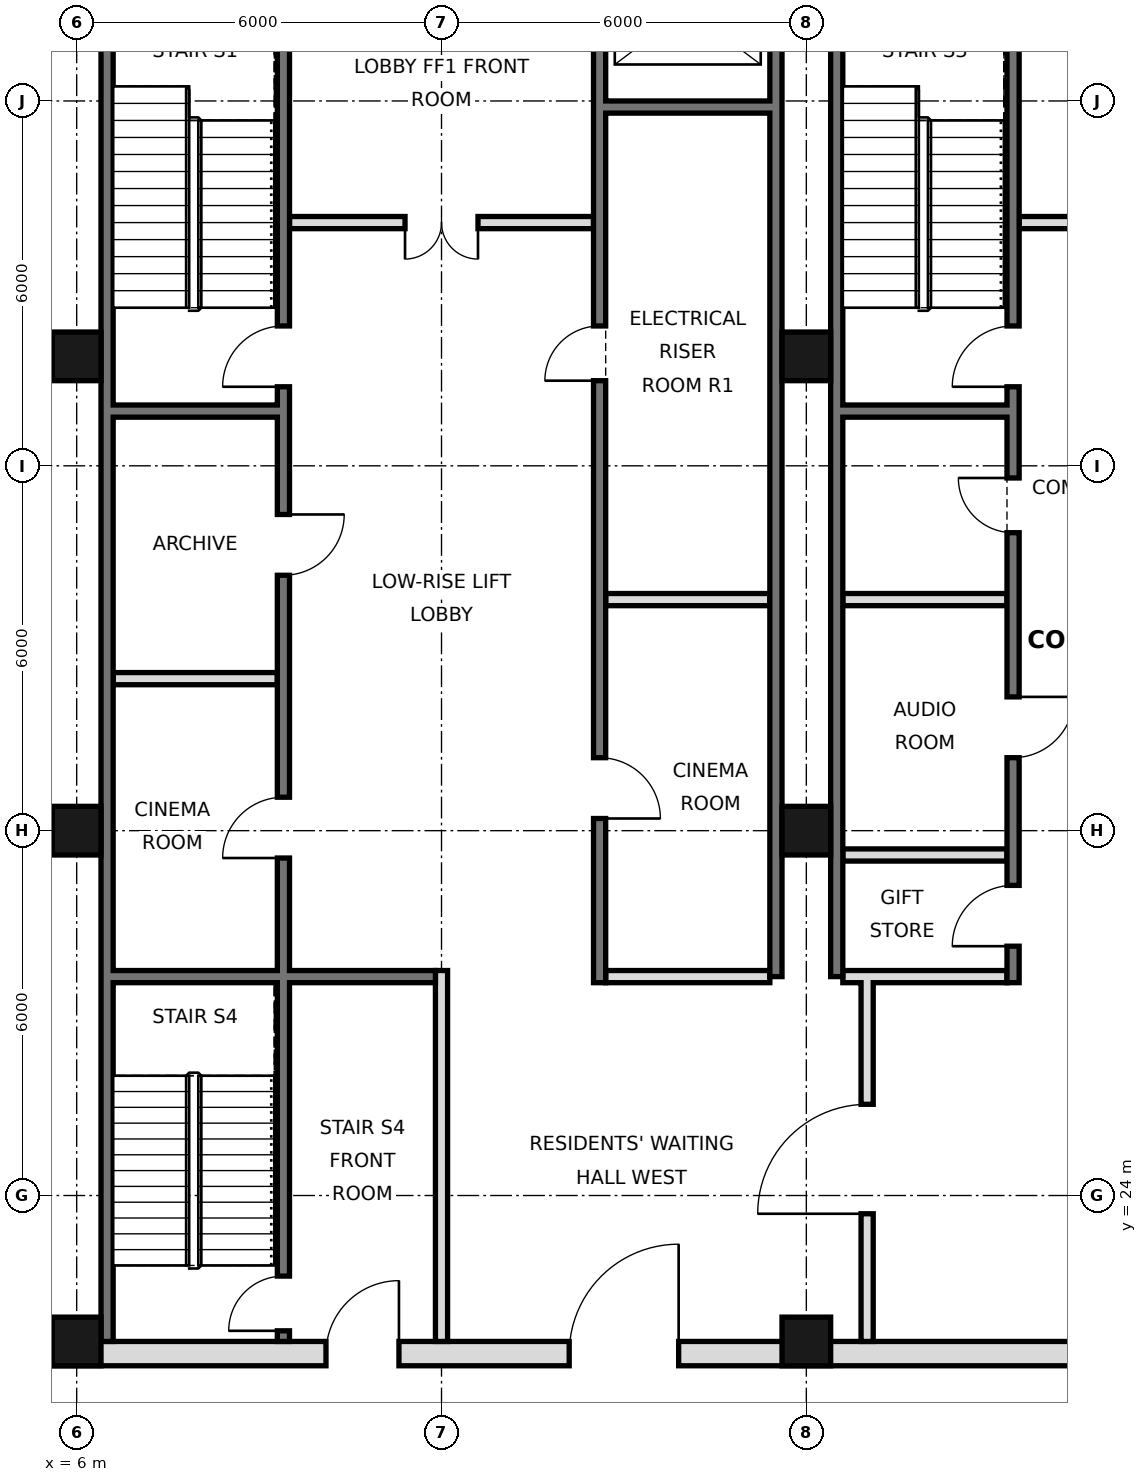
"""IFC4 building model, lengths in metres.
Left out: names, types, materials, properties, quantities, classifications, styles, units other than length and angle.
Written with IfcOpenShell. Run it as: python <this file> out.ifc"""

import sys

from ifc_helpers import new_model, si_unit, direction, frame, frame_2d, origin, origin_2d, place, context, subcontext, project, spatial, rectangle, hollow_rectangle, extrude, element, fill, save


model = new_model("IFC4")
c1 = context("Model", 3, precision=1e-05, world=origin(), true_north=direction((0.0, 1.0)))
c2 = subcontext(c1, "Body", "Model", "MODEL_VIEW")
j1 = project(units=[si_unit("LENGTHUNIT", "METRE"), si_unit("PLANEANGLEUNIT", "RADIAN")], contexts=[c1])
p1 = place(None, origin())
s1 = spatial("IfcSite", under=j1, at=p1, CompositionType="ELEMENT")
p2 = place(p1, origin())
s2 = spatial("IfcBuilding", under=s1, at=p2, CompositionType="ELEMENT")
p3 = place(p2, frame((0.0, 0.0, 277.4)))
s3 = spatial("IfcBuildingStorey", under=s2, at=p3, CompositionType="ELEMENT", Elevation=277.4)
for number, where, z_axis, x_axis in (
    (1, (6.0, 21.6, 0.0), (0.0, 0.0, 1.0), (1.0, 0.0, 0.0)),
    (2, (6.0, 30.0, 0.0), (0.0, 0.0, 1.0), (1.0, 0.0, 0.0)),
    (3, (6.0, 37.8, 0.0), (0.0, 0.0, 1.0), (1.0, 0.0, 0.0)),
    (4, (18.0, 21.6, 0.0), (0.0, 0.0, 1.0), (1.0, 0.0, 0.0)),
    (5, (18.0, 30.0, 0.0), (0.0, 0.0, 1.0), (1.0, 0.0, 0.0)),
    (6, (18.0, 37.8, 0.0), (0.0, 0.0, 1.0), (1.0, 0.0, 0.0)),
):
    element("IfcColumn", number, at=place(p3, frame(where, z_axis=z_axis, x_axis=x_axis)), inside=s3, PredefinedType="COLUMN", context=c2, shape_type="SweptSolid", body=[
        extrude(hollow_rectangle(XDim=0.8, YDim=0.8, WallThickness=0.032, at=origin_2d()), origin(), (0.0, 0.0, 1.0), 4.4),
    ])
p4 = place(p3, frame((6.5, 21.6, 0.0), z_axis=(0.0, 0.0, 1.0), x_axis=(0.0, 1.0, 0.0)))
e7 = element("IfcWall", 7, at=p4, inside=s3, PredefinedType="SOLIDWALL", context=c2, shape_type="SweptSolid", body=[
    extrude(rectangle(XDim=23.5, YDim=0.2, at=frame_2d((11.75, 0.0))), origin(), (0.0, 0.0, 1.0), 4.1),
])
for number, where, z_axis, x_axis in (
    (8, (17.5, 27.6, 0.0), (0.0, 0.0, 1.0), (0.0, 1.0, 0.0)),
    (9, (18.5, 27.6, 0.0), (0.0, 0.0, 1.0), (0.0, 1.0, 0.0)),
):
    element("IfcWall", number, at=place(p3, frame(where, z_axis=z_axis, x_axis=x_axis)), inside=s3, PredefinedType="SOLIDWALL", context=c2, shape_type="SweptSolid", body=[
        extrude(rectangle(XDim=17.5, YDim=0.2, at=frame_2d((8.75, 0.0))), origin(), (0.0, 0.0, 1.0), 4.1),
    ])
p5 = place(p3, frame((5.6, 21.4, 0.0), z_axis=(0.0, 0.0, 1.0), x_axis=(1.0, 0.0, 0.0)))
e10 = element("IfcWall", 10, at=p5, inside=s3, PredefinedType="SOLIDWALL", context=c2, shape_type="SweptSolid", body=[
    extrude(rectangle(XDim=36.8, YDim=0.4, at=frame_2d((18.4, 0.0))), origin(), (0.0, 0.0, 1.0), 4.1),
])
p6 = place(p5, frame((8.5, 0.0, 0.0)))
e11 = element("IfcOpeningElement", 11, at=p6, cuts=e10, PredefinedType="OPENING", context=c2, shape_type="SweptSolid", body=[
    extrude(rectangle(XDim=1.8, YDim=2.1, at=frame_2d((0.9, 1.05))), frame((0.0, 0.21, 0.0), z_axis=(0.0, -1.0, 0.0), x_axis=(1.0, 0.0, 0.0)), (0.0, 0.0, 1.0), 0.42),
])
p7 = place(p5, frame((17.5, 0.0, 0.0)))
e12 = element("IfcOpeningElement", 12, at=p7, cuts=e10, PredefinedType="OPENING", context=c2, shape_type="SweptSolid", body=[
    extrude(rectangle(XDim=1.8, YDim=2.1, at=frame_2d((0.9, 1.05))), frame((0.0, 0.21, 0.0), z_axis=(0.0, -1.0, 0.0), x_axis=(1.0, 0.0, 0.0)), (0.0, 0.0, 1.0), 0.42),
])
p8 = place(p5, frame((26.5, 0.0, 0.0)))
e13 = element("IfcOpeningElement", 13, at=p8, cuts=e10, PredefinedType="OPENING", context=c2, shape_type="SweptSolid", body=[
    extrude(rectangle(XDim=1.8, YDim=2.1, at=frame_2d((0.9, 1.05))), frame((0.0, 0.21, 0.0), z_axis=(0.0, -1.0, 0.0), x_axis=(1.0, 0.0, 0.0)), (0.0, 0.0, 1.0), 0.42),
])
p9 = place(p5, frame((4.5, 0.0, 0.0)))
e14 = element("IfcOpeningElement", 14, at=p9, cuts=e10, PredefinedType="OPENING", context=c2, shape_type="SweptSolid", body=[
    extrude(rectangle(XDim=1.2, YDim=2.1, at=frame_2d((0.6, 1.05))), frame((0.0, 0.21, 0.0), z_axis=(0.0, -1.0, 0.0), x_axis=(1.0, 0.0, 0.0)), (0.0, 0.0, 1.0), 0.42),
])
p10 = place(p5, frame((31.1, 0.0, 0.0)))
e15 = element("IfcOpeningElement", 15, at=p10, cuts=e10, PredefinedType="OPENING", context=c2, shape_type="SweptSolid", body=[
    extrude(rectangle(XDim=1.2, YDim=2.1, at=frame_2d((0.6, 1.05))), frame((0.0, 0.21, 0.0), z_axis=(0.0, -1.0, 0.0), x_axis=(1.0, 0.0, 0.0)), (0.0, 0.0, 1.0), 0.42),
])
p11 = place(p3, frame((19.0, 21.6, 0.0), z_axis=(0.0, 0.0, 1.0), x_axis=(0.0, 1.0, 0.0)))
e16 = element("IfcWall", 16, at=p11, inside=s3, PredefinedType="PARTITIONING", context=c2, shape_type="SweptSolid", body=[
    extrude(rectangle(XDim=6.0, YDim=0.2, at=frame_2d((3.0, 0.0))), origin(), (0.0, 0.0, 1.0), 4.1),
])
p12 = place(p11, frame((2.1, 0.0, 0.0)))
e17 = element("IfcOpeningElement", 17, at=p12, cuts=e16, PredefinedType="OPENING", context=c2, shape_type="SweptSolid", body=[
    extrude(rectangle(XDim=1.8, YDim=2.1, at=frame_2d((0.9, 1.05))), frame((0.0, 0.11, 0.0), z_axis=(0.0, -1.0, 0.0), x_axis=(1.0, 0.0, 0.0)), (0.0, 0.0, 1.0), 0.22),
])
p13 = place(p3, frame((12.0, 21.6, 0.0), z_axis=(0.0, 0.0, 1.0), x_axis=(0.0, 1.0, 0.0)))
e18 = element("IfcWall", 18, at=p13, inside=s3, PredefinedType="PARTITIONING", context=c2, shape_type="SweptSolid", body=[
    extrude(rectangle(XDim=6.1, YDim=0.2, at=frame_2d((3.05, 0.0))), origin(), (0.0, 0.0, 1.0), 4.1),
])
p14 = place(p3, frame((14.6, 27.5, 0.0), z_axis=(0.0, 0.0, 1.0), x_axis=(0.0, 1.0, 0.0)))
e19 = element("IfcWall", 19, at=p14, inside=s3, PredefinedType="SOLIDWALL", context=c2, shape_type="SweptSolid", body=[
    extrude(rectangle(XDim=17.5, YDim=0.2, at=frame_2d((8.75, 0.0))), origin(), (0.0, 0.0, 1.0), 4.1),
])
p15 = place(p14, frame((15.4, 0.0, 0.0)))
e20 = element("IfcOpeningElement", 20, at=p15, cuts=e19, PredefinedType="OPENING", context=c2, shape_type="SweptSolid", body=[
    extrude(rectangle(XDim=1.1, YDim=2.1, at=frame_2d((0.55, 1.05))), frame((0.0, 0.11, 0.0), z_axis=(0.0, -1.0, 0.0), x_axis=(1.0, 0.0, 0.0)), (0.0, 0.0, 1.0), 0.22),
])
p16 = place(p14, frame((2.7, 0.0, 0.0)))
e21 = element("IfcOpeningElement", 21, at=p16, cuts=e19, PredefinedType="OPENING", context=c2, shape_type="SweptSolid", body=[
    extrude(rectangle(XDim=1.0, YDim=2.1, at=frame_2d((0.5, 1.05))), frame((0.0, 0.11, 0.0), z_axis=(0.0, -1.0, 0.0), x_axis=(1.0, 0.0, 0.0)), (0.0, 0.0, 1.0), 0.22),
])
p17 = place(p14, frame((9.9, 0.0, 0.0)))
e22 = element("IfcOpeningElement", 22, at=p17, cuts=e19, PredefinedType="OPENING", context=c2, shape_type="SweptSolid", body=[
    extrude(rectangle(XDim=0.9, YDim=2.1, at=frame_2d((0.45, 1.05))), frame((0.0, 0.11, 0.0), z_axis=(0.0, -1.0, 0.0), x_axis=(1.0, 0.0, 0.0)), (0.0, 0.0, 1.0), 0.22),
])
p18 = place(p3, frame((21.4, 27.5, 0.0), z_axis=(0.0, 0.0, 1.0), x_axis=(0.0, 1.0, 0.0)))
e23 = element("IfcWall", 23, at=p18, inside=s3, PredefinedType="SOLIDWALL", context=c2, shape_type="SweptSolid", body=[
    extrude(rectangle(XDim=17.5, YDim=0.2, at=frame_2d((8.75, 0.0))), origin(), (0.0, 0.0, 1.0), 4.1),
])
p19 = place(p18, frame((0.6, 0.0, 0.0)))
e24 = element("IfcOpeningElement", 24, at=p19, cuts=e23, PredefinedType="OPENING", context=c2, shape_type="SweptSolid", body=[
    extrude(rectangle(XDim=1.0, YDim=2.1, at=frame_2d((0.5, 1.05))), frame((0.0, 0.11, 0.0), z_axis=(0.0, -1.0, 0.0), x_axis=(1.0, 0.0, 0.0)), (0.0, 0.0, 1.0), 0.22),
])
p20 = place(p18, frame((3.7, 0.0, 0.0)))
e25 = element("IfcOpeningElement", 25, at=p20, cuts=e23, PredefinedType="OPENING", context=c2, shape_type="SweptSolid", body=[
    extrude(rectangle(XDim=1.0, YDim=2.1, at=frame_2d((0.5, 1.05))), frame((0.0, 0.11, 0.0), z_axis=(0.0, -1.0, 0.0), x_axis=(1.0, 0.0, 0.0)), (0.0, 0.0, 1.0), 0.22),
])
p21 = place(p18, frame((9.8, 0.0, 0.0)))
e26 = element("IfcOpeningElement", 26, at=p21, cuts=e23, PredefinedType="OPENING", context=c2, shape_type="SweptSolid", body=[
    extrude(rectangle(XDim=1.0, YDim=2.1, at=frame_2d((0.5, 1.05))), frame((0.0, 0.11, 0.0), z_axis=(0.0, -1.0, 0.0), x_axis=(1.0, 0.0, 0.0)), (0.0, 0.0, 1.0), 0.22),
])
p22 = place(p18, frame((7.4, 0.0, 0.0)))
e27 = element("IfcOpeningElement", 27, at=p22, cuts=e23, PredefinedType="OPENING", context=c2, shape_type="SweptSolid", body=[
    extrude(rectangle(XDim=0.9, YDim=2.1, at=frame_2d((0.45, 1.05))), frame((0.0, 0.11, 0.0), z_axis=(0.0, -1.0, 0.0), x_axis=(1.0, 0.0, 0.0)), (0.0, 0.0, 1.0), 0.22),
])
p23 = place(p3, frame((9.4, 21.6, 0.0), z_axis=(0.0, 0.0, 1.0), x_axis=(0.0, 1.0, 0.0)))
e28 = element("IfcWall", 28, at=p23, inside=s3, PredefinedType="SOLIDWALL", context=c2, shape_type="SweptSolid", body=[
    extrude(rectangle(XDim=23.4, YDim=0.2, at=frame_2d((11.7, 0.0))), origin(), (0.0, 0.0, 1.0), 4.1),
])
p24 = place(p23, frame((7.95, 0.0, 0.0)))
e29 = element("IfcOpeningElement", 29, at=p24, cuts=e28, PredefinedType="OPENING", context=c2, shape_type="SweptSolid", body=[
    extrude(rectangle(XDim=1.0, YDim=2.1, at=frame_2d((0.5, 1.05))), frame((0.0, 0.11, 0.0), z_axis=(0.0, -1.0, 0.0), x_axis=(1.0, 0.0, 0.0)), (0.0, 0.0, 1.0), 0.22),
])
p25 = place(p23, frame((12.6, 0.0, 0.0)))
e30 = element("IfcOpeningElement", 30, at=p25, cuts=e28, PredefinedType="OPENING", context=c2, shape_type="SweptSolid", body=[
    extrude(rectangle(XDim=1.0, YDim=2.1, at=frame_2d((0.5, 1.05))), frame((0.0, 0.11, 0.0), z_axis=(0.0, -1.0, 0.0), x_axis=(1.0, 0.0, 0.0)), (0.0, 0.0, 1.0), 0.22),
])
p26 = place(p23, frame((15.7, 0.0, 0.0)))
e31 = element("IfcOpeningElement", 31, at=p26, cuts=e28, PredefinedType="OPENING", context=c2, shape_type="SweptSolid", body=[
    extrude(rectangle(XDim=1.0, YDim=2.1, at=frame_2d((0.5, 1.05))), frame((0.0, 0.11, 0.0), z_axis=(0.0, -1.0, 0.0), x_axis=(1.0, 0.0, 0.0)), (0.0, 0.0, 1.0), 0.22),
])
p27 = place(p23, frame((0.175, 0.0, 0.0)))
e32 = element("IfcOpeningElement", 32, at=p27, cuts=e28, PredefinedType="OPENING", context=c2, shape_type="SweptSolid", body=[
    extrude(rectangle(XDim=0.9, YDim=2.1, at=frame_2d((0.45, 1.05))), frame((0.0, 0.11, 0.0), z_axis=(0.0, -1.0, 0.0), x_axis=(1.0, 0.0, 0.0)), (0.0, 0.0, 1.0), 0.22),
])
for number, where, z_axis, x_axis in (
    (33, (14.7, 27.6, 0.0), (0.0, 0.0, 1.0), (1.0, 0.0, 0.0)),
    (34, (18.6, 27.6, 0.0), (0.0, 0.0, 1.0), (1.0, 0.0, 0.0)),
):
    element("IfcWall", number, at=place(p3, frame(where, z_axis=z_axis, x_axis=x_axis)), inside=s3, PredefinedType="PARTITIONING", context=c2, shape_type="SweptSolid", body=[
        extrude(rectangle(XDim=2.7, YDim=0.2, at=frame_2d((1.35, 0.0))), origin(), (0.0, 0.0, 1.0), 4.1),
    ])
p28 = place(p3, frame((6.6, 27.6, 0.0), z_axis=(0.0, 0.0, 1.0), x_axis=(1.0, 0.0, 0.0)))
e35 = element("IfcWall", 35, at=p28, inside=s3, PredefinedType="SOLIDWALL", context=c2, shape_type="SweptSolid", body=[
    extrude(rectangle(XDim=5.3, YDim=0.2, at=frame_2d((2.65, 0.0))), origin(), (0.0, 0.0, 1.0), 4.1),
])
for number, where, z_axis, x_axis in (
    (36, (18.6, 29.6, 0.0), (0.0, 0.0, 1.0), (1.0, 0.0, 0.0)),
    (37, (6.6, 32.5, 0.0), (0.0, 0.0, 1.0), (1.0, 0.0, 0.0)),
):
    element("IfcWall", number, at=place(p3, frame(where, z_axis=z_axis, x_axis=x_axis)), inside=s3, PredefinedType="PARTITIONING", context=c2, shape_type="SweptSolid", body=[
        extrude(rectangle(XDim=2.7, YDim=0.2, at=frame_2d((1.35, 0.0))), origin(), (0.0, 0.0, 1.0), 4.1),
    ])
for number, where, z_axis, x_axis in (
    (38, (14.7, 33.8, 0.0), (0.0, 0.0, 1.0), (1.0, 0.0, 0.0)),
    (39, (18.6, 33.8, 0.0), (0.0, 0.0, 1.0), (1.0, 0.0, 0.0)),
    (40, (18.6, 36.9, 0.0), (0.0, 0.0, 1.0), (1.0, 0.0, 0.0)),
    (41, (6.6, 36.9, 0.0), (0.0, 0.0, 1.0), (1.0, 0.0, 0.0)),
):
    element("IfcWall", number, at=place(p3, frame(where, z_axis=z_axis, x_axis=x_axis)), inside=s3, PredefinedType="SOLIDWALL", context=c2, shape_type="SweptSolid", body=[
        extrude(rectangle(XDim=2.7, YDim=0.2, at=frame_2d((1.35, 0.0))), origin(), (0.0, 0.0, 1.0), 4.1),
    ])
p29 = place(p3, frame((21.5, 40.0, 0.0), z_axis=(0.0, 0.0, 1.0), x_axis=(1.0, 0.0, 0.0)))
e42 = element("IfcWall", 42, at=p29, inside=s3, PredefinedType="PARTITIONING", context=c2, shape_type="SweptSolid", body=[
    extrude(rectangle(XDim=5.0, YDim=0.2, at=frame_2d((2.5, 0.0))), origin(), (0.0, 0.0, 1.0), 4.1),
])
p30 = place(p29, frame((1.9, 0.0, 0.0)))
e43 = element("IfcOpeningElement", 43, at=p30, cuts=e42, PredefinedType="OPENING", context=c2, shape_type="SweptSolid", body=[
    extrude(rectangle(XDim=1.2, YDim=2.1, at=frame_2d((0.6, 1.05))), frame((0.0, 0.11, 0.0), z_axis=(0.0, -1.0, 0.0), x_axis=(1.0, 0.0, 0.0)), (0.0, 0.0, 1.0), 0.22),
])
p31 = place(p3, frame((9.5, 40.0, 0.0), z_axis=(0.0, 0.0, 1.0), x_axis=(1.0, 0.0, 0.0)))
e44 = element("IfcWall", 44, at=p31, inside=s3, PredefinedType="PARTITIONING", context=c2, shape_type="SweptSolid", body=[
    extrude(rectangle(XDim=5.0, YDim=0.2, at=frame_2d((2.5, 0.0))), origin(), (0.0, 0.0, 1.0), 4.1),
])
p32 = place(p31, frame((1.9, 0.0, 0.0)))
e45 = element("IfcOpeningElement", 45, at=p32, cuts=e44, PredefinedType="OPENING", context=c2, shape_type="SweptSolid", body=[
    extrude(rectangle(XDim=1.2, YDim=2.1, at=frame_2d((0.6, 1.05))), frame((0.0, 0.11, 0.0), z_axis=(0.0, -1.0, 0.0), x_axis=(1.0, 0.0, 0.0)), (0.0, 0.0, 1.0), 0.22),
])
p33 = place(p3, frame((14.7, 41.9, 0.0), z_axis=(0.0, 0.0, 1.0), x_axis=(1.0, 0.0, 0.0)))
e46 = element("IfcWall", 46, at=p33, inside=s3, PredefinedType="SOLIDWALL", context=c2, shape_type="SweptSolid", body=[
    extrude(rectangle(XDim=2.7, YDim=0.2, at=frame_2d((1.35, 0.0))), origin(), (0.0, 0.0, 1.0), 4.1),
])
p34 = place(p6, frame((1.8, 0.0, 0.0), z_axis=(0.0, 0.0, 1.0), x_axis=(-1.0, 0.0, 0.0)))
e47 = element("IfcDoor", 47, at=p34, inside=s3, OperationType="SINGLE_SWING_LEFT", PredefinedType="DOOR", context=c2, shape_type="SweptSolid", body=[
    extrude(rectangle(XDim=1.8, YDim=2.1, at=frame_2d((0.9, 1.05))), frame((0.0, 0.025, 0.0), z_axis=(0.0, -1.0, 0.0), x_axis=(1.0, 0.0, 0.0)), (0.0, 0.0, 1.0), 0.05),
])
fill(e11, e47)
p35 = place(p12, origin())
e48 = element("IfcDoor", 48, at=p35, inside=s3, OperationType="SINGLE_SWING_LEFT", PredefinedType="DOOR", context=c2, shape_type="SweptSolid", body=[
    extrude(rectangle(XDim=1.8, YDim=2.1, at=frame_2d((0.9, 1.05))), frame((0.0, 0.025, 0.0), z_axis=(0.0, -1.0, 0.0), x_axis=(1.0, 0.0, 0.0)), (0.0, 0.0, 1.0), 0.05),
])
fill(e17, e48)
p36 = place(p9, frame((1.2, 0.0, 0.0), z_axis=(0.0, 0.0, 1.0), x_axis=(-1.0, 0.0, 0.0)))
e49 = element("IfcDoor", 49, at=p36, inside=s3, OperationType="SINGLE_SWING_LEFT", PredefinedType="DOOR", context=c2, shape_type="SweptSolid", body=[
    extrude(rectangle(XDim=1.2, YDim=2.1, at=frame_2d((0.6, 1.05))), frame((0.0, 0.025, 0.0), z_axis=(0.0, -1.0, 0.0), x_axis=(1.0, 0.0, 0.0)), (0.0, 0.0, 1.0), 0.05),
])
fill(e14, e49)
p37 = place(p32, frame((1.2, 0.0, 0.0), z_axis=(0.0, 0.0, 1.0), x_axis=(-1.0, 0.0, 0.0)))
e50 = element("IfcDoor", 50, at=p37, inside=s3, OperationType="DOUBLE_DOOR_SINGLE_SWING", PredefinedType="DOOR", context=c2, shape_type="SweptSolid", body=[
    extrude(rectangle(XDim=1.2, YDim=2.1, at=frame_2d((0.6, 1.05))), frame((0.0, 0.025, 0.0), z_axis=(0.0, -1.0, 0.0), x_axis=(1.0, 0.0, 0.0)), (0.0, 0.0, 1.0), 0.05),
])
fill(e45, e50)
p38 = place(p19, origin())
e51 = element("IfcDoor", 51, at=p38, inside=s3, OperationType="SINGLE_SWING_LEFT", PredefinedType="DOOR", context=c2, shape_type="SweptSolid", body=[
    extrude(rectangle(XDim=1.0, YDim=2.1, at=frame_2d((0.5, 1.05))), frame((0.0, 0.025, 0.0), z_axis=(0.0, -1.0, 0.0), x_axis=(1.0, 0.0, 0.0)), (0.0, 0.0, 1.0), 0.05),
])
fill(e24, e51)
p39 = place(p20, origin())
e52 = element("IfcDoor", 52, at=p39, inside=s3, OperationType="SINGLE_SWING_RIGHT", PredefinedType="DOOR", context=c2, shape_type="SweptSolid", body=[
    extrude(rectangle(XDim=1.0, YDim=2.1, at=frame_2d((0.5, 1.05))), frame((0.0, 0.025, 0.0), z_axis=(0.0, -1.0, 0.0), x_axis=(1.0, 0.0, 0.0)), (0.0, 0.0, 1.0), 0.05),
])
fill(e25, e52)
p40 = place(p16, frame((1.0, 0.0, 0.0), z_axis=(0.0, 0.0, 1.0), x_axis=(-1.0, 0.0, 0.0)))
e53 = element("IfcDoor", 53, at=p40, inside=s3, OperationType="SINGLE_SWING_RIGHT", PredefinedType="DOOR", context=c2, shape_type="SweptSolid", body=[
    extrude(rectangle(XDim=1.0, YDim=2.1, at=frame_2d((0.5, 1.05))), frame((0.0, 0.025, 0.0), z_axis=(0.0, -1.0, 0.0), x_axis=(1.0, 0.0, 0.0)), (0.0, 0.0, 1.0), 0.05),
])
fill(e21, e53)
p41 = place(p24, origin())
e54 = element("IfcDoor", 54, at=p41, inside=s3, OperationType="SINGLE_SWING_LEFT", PredefinedType="DOOR", context=c2, shape_type="SweptSolid", body=[
    extrude(rectangle(XDim=1.0, YDim=2.1, at=frame_2d((0.5, 1.05))), frame((0.0, 0.025, 0.0), z_axis=(0.0, -1.0, 0.0), x_axis=(1.0, 0.0, 0.0)), (0.0, 0.0, 1.0), 0.05),
])
fill(e29, e54)
p42 = place(p25, origin())
e55 = element("IfcDoor", 55, at=p42, inside=s3, OperationType="SINGLE_SWING_RIGHT", PredefinedType="DOOR", context=c2, shape_type="SweptSolid", body=[
    extrude(rectangle(XDim=1.0, YDim=2.1, at=frame_2d((0.5, 1.05))), frame((0.0, 0.025, 0.0), z_axis=(0.0, -1.0, 0.0), x_axis=(1.0, 0.0, 0.0)), (0.0, 0.0, 1.0), 0.05),
])
fill(e30, e55)
p43 = place(p26, origin())
e56 = element("IfcDoor", 56, at=p43, inside=s3, OperationType="SINGLE_SWING_LEFT", PredefinedType="DOOR", context=c2, shape_type="SweptSolid", body=[
    extrude(rectangle(XDim=1.0, YDim=2.1, at=frame_2d((0.5, 1.05))), frame((0.0, 0.025, 0.0), z_axis=(0.0, -1.0, 0.0), x_axis=(1.0, 0.0, 0.0)), (0.0, 0.0, 1.0), 0.05),
])
fill(e31, e56)
p44 = place(p21, origin())
e57 = element("IfcDoor", 57, at=p44, inside=s3, OperationType="SINGLE_SWING_LEFT", PredefinedType="DOOR", context=c2, shape_type="SweptSolid", body=[
    extrude(rectangle(XDim=1.0, YDim=2.1, at=frame_2d((0.5, 1.05))), frame((0.0, 0.025, 0.0), z_axis=(0.0, -1.0, 0.0), x_axis=(1.0, 0.0, 0.0)), (0.0, 0.0, 1.0), 0.05),
])
fill(e26, e57)
p45 = place(p27, origin())
e58 = element("IfcDoor", 58, at=p45, inside=s3, OperationType="SINGLE_SWING_LEFT", PredefinedType="DOOR", context=c2, shape_type="SweptSolid", body=[
    extrude(rectangle(XDim=0.9, YDim=2.1, at=frame_2d((0.45, 1.05))), frame((0.0, 0.025, 0.0), z_axis=(0.0, -1.0, 0.0), x_axis=(1.0, 0.0, 0.0)), (0.0, 0.0, 1.0), 0.05),
])
fill(e32, e58)
p46 = place(p17, origin())
e59 = element("IfcDoor", 59, at=p46, inside=s3, OperationType="SINGLE_SWING_LEFT", PredefinedType="DOOR", context=c2, shape_type="SweptSolid", body=[
    extrude(rectangle(XDim=0.9, YDim=2.1, at=frame_2d((0.45, 1.05))), frame((0.0, 0.025, 0.0), z_axis=(0.0, -1.0, 0.0), x_axis=(1.0, 0.0, 0.0)), (0.0, 0.0, 1.0), 0.05),
])
fill(e22, e59)
p47 = place(p22, frame((0.9, 0.0, 0.0), z_axis=(0.0, 0.0, 1.0), x_axis=(-1.0, 0.0, 0.0)))
e60 = element("IfcDoor", 60, at=p47, inside=s3, OperationType="SINGLE_SWING_LEFT", PredefinedType="DOOR", context=c2, shape_type="SweptSolid", body=[
    extrude(rectangle(XDim=0.9, YDim=2.1, at=frame_2d((0.45, 1.05))), frame((0.0, 0.025, 0.0), z_axis=(0.0, -1.0, 0.0), x_axis=(1.0, 0.0, 0.0)), (0.0, 0.0, 1.0), 0.05),
])
fill(e27, e60)
save(model, sys.argv[1])
